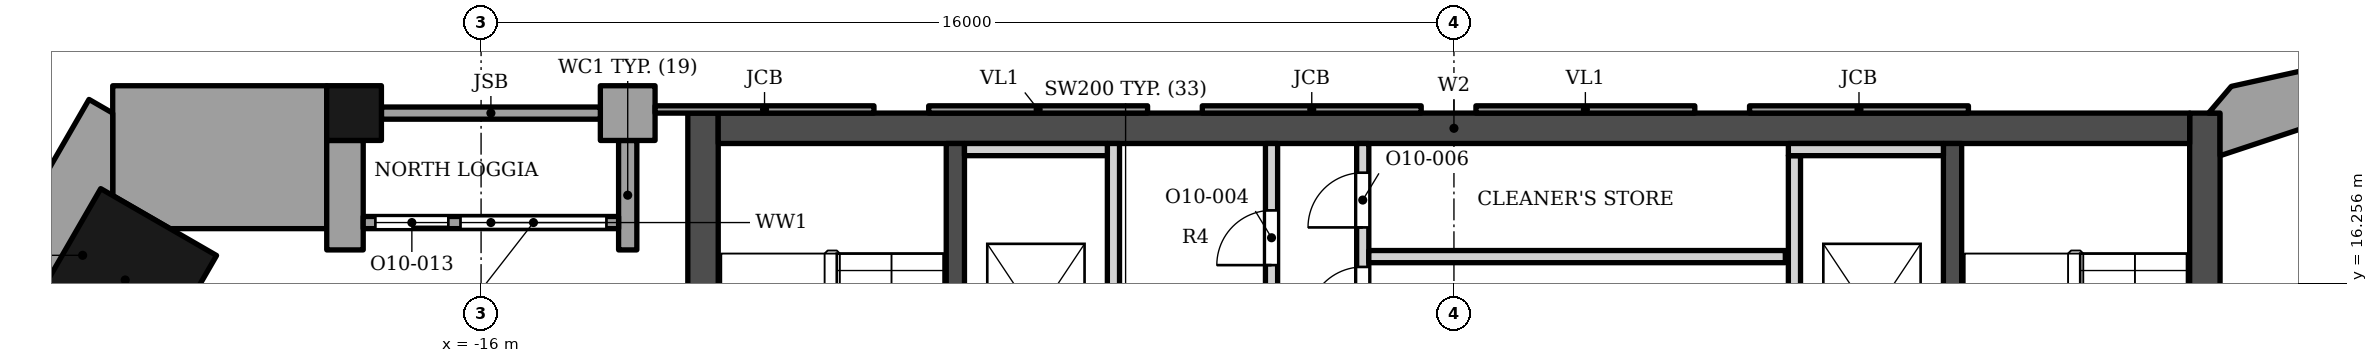
"""IFC4 building model, lengths in metres.
Left out: names, types, materials, properties, quantities, classifications, styles, units other than length and angle.
Written with IfcOpenShell. Run it as: python <this file> out.ifc"""

import sys

from ifc_helpers import new_model, si_unit, direction, frame, frame_2d, origin, origin_2d, place, context, subcontext, project, spatial, polyline, rectangle, outline, extrude, element, fill, save


model = new_model("IFC4")
c1 = context("Model", 3, precision=1e-05, world=origin(), true_north=direction((0.0, 1.0)))
c2 = subcontext(c1, "Body", "Model", "MODEL_VIEW")
j1 = project(units=[si_unit("LENGTHUNIT", "METRE"), si_unit("PLANEANGLEUNIT", "RADIAN")], contexts=[c1])
p1 = place(None, origin())
s1 = spatial("IfcSite", under=j1, at=p1, CompositionType="ELEMENT")
p2 = place(p1, origin())
s2 = spatial("IfcBuilding", under=s1, at=p2, CompositionType="ELEMENT")
p3 = place(p2, frame((0.0, 0.0, 259.9)))
s3 = spatial("IfcBuildingStorey", under=s2, at=p3, CompositionType="ELEMENT", Elevation=259.9)
p4 = place(p3, frame((-12.1, 18.802, 0.0), z_axis=(0.0, 0.0, 1.0), x_axis=(1.0, 0.0, 0.0)))
e1 = element("IfcWall", 1, at=p4, inside=s3, PredefinedType="SHEAR", context=c2, shape_type="SweptSolid", body=[
    extrude(rectangle(XDim=24.2, YDim=0.5, at=frame_2d((12.1, 0.0))), origin(), (0.0, 0.0, 1.0), 3.9),
])
p5 = place(p3, frame((-12.35, 5.253, 0.0), z_axis=(0.0, 0.0, 1.0), x_axis=(0.0, 1.0, 0.0)))
e2 = element("IfcWall", 2, at=p5, inside=s3, PredefinedType="SHEAR", context=c2, shape_type="SweptSolid", body=[
    extrude(rectangle(XDim=13.8, YDim=0.5, at=frame_2d((6.9, 0.0))), origin(), (0.0, 0.0, 1.0), 3.9),
])
p6 = place(p3, frame((-8.2, 5.253, 0.0), z_axis=(0.0, 0.0, 1.0), x_axis=(0.0, 1.0, 0.0)))
e3 = element("IfcWall", 3, at=p6, inside=s3, PredefinedType="SHEAR", context=c2, shape_type="SweptSolid", body=[
    extrude(rectangle(XDim=13.3, YDim=0.3, at=frame_2d((6.65, 0.0))), origin(), (0.0, 0.0, 1.0), 3.9),
])
p7 = place(p6, frame((7.1, 0.0, 0.0)))
e4 = element("IfcOpeningElement", 4, at=p7, cuts=e3, PredefinedType="OPENING", context=c2, shape_type="SweptSolid", body=[
    extrude(rectangle(XDim=1.4, YDim=2.1, at=frame_2d((0.7, 1.05))), frame((0.0, 0.16, 0.0), z_axis=(0.0, -1.0, 0.0), x_axis=(1.0, 0.0, 0.0)), (0.0, 0.0, 1.0), 0.32),
])
p8 = place(p6, frame((5.05, 0.0, 0.0)))
e5 = element("IfcOpeningElement", 5, at=p8, cuts=e3, PredefinedType="OPENING", context=c2, shape_type="SweptSolid", body=[
    extrude(rectangle(XDim=1.4, YDim=2.1, at=frame_2d((0.7, 1.05))), frame((0.0, 0.16, 0.0), z_axis=(0.0, -1.0, 0.0), x_axis=(1.0, 0.0, 0.0)), (0.0, 0.0, 1.0), 0.32),
])
p9 = place(p3, frame((12.35, 5.253, 0.0), z_axis=(0.0, 0.0, 1.0), x_axis=(0.0, 1.0, 0.0)))
e6 = element("IfcWall", 6, at=p9, inside=s3, PredefinedType="SHEAR", context=c2, shape_type="SweptSolid", body=[
    extrude(rectangle(XDim=13.8, YDim=0.5, at=frame_2d((6.9, 0.0))), origin(), (0.0, 0.0, 1.0), 3.9),
])
p10 = place(p3, frame((8.2, 5.253, 0.0), z_axis=(0.0, 0.0, 1.0), x_axis=(0.0, 1.0, 0.0)))
e7 = element("IfcWall", 7, at=p10, inside=s3, PredefinedType="SHEAR", context=c2, shape_type="SweptSolid", body=[
    extrude(rectangle(XDim=13.3, YDim=0.3, at=frame_2d((6.65, 0.0))), origin(), (0.0, 0.0, 1.0), 3.9),
])
p11 = place(p10, frame((7.1, 0.0, 0.0)))
e8 = element("IfcOpeningElement", 8, at=p11, cuts=e7, PredefinedType="OPENING", context=c2, shape_type="SweptSolid", body=[
    extrude(rectangle(XDim=1.4, YDim=2.1, at=frame_2d((0.7, 1.05))), frame((0.0, 0.16, 0.0), z_axis=(0.0, -1.0, 0.0), x_axis=(1.0, 0.0, 0.0)), (0.0, 0.0, 1.0), 0.32),
])
p12 = place(p10, frame((5.05, 0.0, 0.0)))
e9 = element("IfcOpeningElement", 9, at=p12, cuts=e7, PredefinedType="OPENING", context=c2, shape_type="SweptSolid", body=[
    extrude(rectangle(XDim=1.4, YDim=2.1, at=frame_2d((0.7, 1.05))), frame((0.0, 0.16, 0.0), z_axis=(0.0, -1.0, 0.0), x_axis=(1.0, 0.0, 0.0)), (0.0, 0.0, 1.0), 0.32),
])
p13 = place(p3, frame((-21.853, 16.308, 0.0), z_axis=(0.0, 0.0, 1.0), x_axis=(0.866025421238, -0.49999996977, 0.0)))
e10 = element("IfcColumn", 10, at=p13, inside=s3, PredefinedType="COLUMN", context=c2, shape_type="SweptSolid", body=[
    extrude(rectangle(XDim=2.2, YDim=2.2, at=origin_2d()), origin(), (0.0, 0.0, 1.0), 3.9),
])
p14 = place(p3, frame((-18.089, 19.053, 0.0), z_axis=(0.0, 0.0, 1.0), x_axis=(-1.0, 0.0, 0.0)))
e11 = element("IfcColumn", 11, at=p14, inside=s3, PredefinedType="COLUMN", context=c2, shape_type="SweptSolid", body=[
    extrude(rectangle(XDim=0.9, YDim=0.9, at=origin_2d()), origin(), (0.0, 0.0, 1.0), 3.9),
])
p15 = place(p3, origin())
e12 = element("IfcWall", 12, at=p15, inside=s3, PredefinedType="SOLIDWALL", context=c2, shape_type="SweptSolid", body=[
    extrude(outline(polyline([(-13.138, 19.502), (-14.039, 19.502), (-14.039, 18.603), (-13.138, 18.603), (-13.138, 19.502)])), origin(), (0.0, 0.0, 1.0), 3.0),
])
p16 = place(p3, origin())
e13 = element("IfcWall", 13, at=p16, inside=s3, PredefinedType="SOLIDWALL", context=c2, shape_type="SweptSolid", body=[
    extrude(outline(polyline([(-13.438, 16.802), (-13.438, 18.603), (-13.739, 18.603), (-13.739, 16.802), (-13.438, 16.802)])), origin(), (0.0, 0.0, 1.0), 3.0),
])
p17 = place(p3, origin())
e14 = element("IfcWall", 14, at=p17, inside=s3, PredefinedType="SOLIDWALL", context=c2, shape_type="SweptSolid", body=[
    extrude(outline(polyline([(-18.539, 18.603), (-18.539, 16.802), (-17.938, 16.802), (-17.938, 18.603), (-18.539, 18.603)])), origin(), (0.0, 0.0, 1.0), 3.0),
])
p18 = place(p3, origin())
e15 = element("IfcWall", 15, at=p18, inside=s3, PredefinedType="SOLIDWALL", context=c2, shape_type="SweptSolid", body=[
    extrude(outline(polyline([(4.862, 19.173), (4.862, 19.052), (8.461, 19.052), (8.461, 19.173), (4.862, 19.173)])), origin(), (0.0, 0.0, 1.0), 3.0),
])
p19 = place(p3, origin())
e16 = element("IfcWall", 16, at=p19, inside=s3, PredefinedType="ELEMENTEDWALL", context=c2, shape_type="SweptSolid", body=[
    extrude(outline(polyline([(0.362, 19.173), (0.362, 19.052), (3.961, 19.052), (3.961, 19.173), (0.362, 19.173)])), origin(), (0.0, 0.0, 1.0), 3.0),
])
p20 = place(p3, origin())
e17 = element("IfcWall", 17, at=p20, inside=s3, PredefinedType="SOLIDWALL", context=c2, shape_type="SweptSolid", body=[
    extrude(outline(polyline([(-4.138, 19.173), (-4.138, 19.052), (-0.539, 19.052), (-0.539, 19.173), (-4.138, 19.173)])), origin(), (0.0, 0.0, 1.0), 3.0),
])
p21 = place(p3, origin())
e18 = element("IfcWall", 18, at=p21, inside=s3, PredefinedType="ELEMENTEDWALL", context=c2, shape_type="SweptSolid", body=[
    extrude(outline(polyline([(-8.638, 19.173), (-8.638, 19.052), (-5.039, 19.052), (-5.039, 19.173), (-8.638, 19.173)])), origin(), (0.0, 0.0, 1.0), 3.0),
])
p22 = place(p3, origin())
e19 = element("IfcWall", 19, at=p22, inside=s3, PredefinedType="SOLIDWALL", context=c2, shape_type="SweptSolid", body=[
    extrude(outline(polyline([(-13.138, 19.173), (-13.138, 19.052), (-9.539, 19.052), (-9.539, 19.173), (-13.138, 19.173)])), origin(), (0.0, 0.0, 1.0), 3.0),
])
p23 = place(p3, frame((-14.039, 19.052, 0.0), z_axis=(0.0, 0.0, 1.0), x_axis=(-1.0, 0.0, 0.0)))
e20 = element("IfcWall", 20, at=p23, inside=s3, PredefinedType="SOLIDWALL", context=c2, shape_type="SweptSolid", body=[
    extrude(rectangle(XDim=3.6, YDim=0.2, at=frame_2d((1.8, 0.0))), origin(), (0.0, 0.0, 1.0), 3.0),
])
p24 = place(p3, frame((-13.739, 17.252, 0.0), z_axis=(0.0, 0.0, 1.0), x_axis=(-1.0, 0.0, 0.0)))
e21 = element("IfcWall", 21, at=p24, inside=s3, PredefinedType="ELEMENTEDWALL", context=c2, shape_type="SweptSolid", body=[
    extrude(rectangle(XDim=4.2, YDim=0.2, at=frame_2d((2.1, 0.0))), origin(), (0.0, 0.0, 1.0), 3.0),
])
p25 = place(p24, frame((0.2, 0.0, 0.45)))
e22 = element("IfcOpeningElement", 22, at=p25, cuts=e21, PredefinedType="OPENING", context=c2, shape_type="SweptSolid", body=[
    extrude(rectangle(XDim=2.4, YDim=2.25, at=frame_2d((1.2, 1.125))), frame((0.0, 0.11, 0.0), z_axis=(0.0, -1.0, 0.0), x_axis=(1.0, 0.0, 0.0)), (0.0, 0.0, 1.0), 0.22),
])
p26 = place(p24, frame((2.8, 0.0, 0.0)))
e23 = element("IfcOpeningElement", 23, at=p26, cuts=e21, PredefinedType="OPENING", context=c2, shape_type="SweptSolid", body=[
    extrude(rectangle(XDim=1.2, YDim=2.7, at=frame_2d((0.6, 1.35))), frame((0.0, 0.11, 0.0), z_axis=(0.0, -1.0, 0.0), x_axis=(1.0, 0.0, 0.0)), (0.0, 0.0, 1.0), 0.22),
])
p27 = place(p3, origin())
e24 = element("IfcWall", 24, at=p27, inside=s3, PredefinedType="SOLIDWALL", context=c2, shape_type="SweptSolid", body=[
    extrude(outline(polyline([(-21.116, 17.153), (-18.539, 17.153), (-18.539, 18.603), (-18.539, 18.603), (-18.539, 19.502), (-22.058, 19.502), (-22.058, 17.697), (-21.116, 17.153)])), origin(), (0.0, 0.0, 1.0), 3.0),
])
p28 = place(p3, origin())
e25 = element("IfcWall", 25, at=p28, inside=s3, PredefinedType="SOLIDWALL", context=c2, shape_type="SweptSolid", body=[
    extrude(outline(polyline([(-23.356, 15.905), (-22.058, 17.697), (-22.058, 19.052), (-22.448, 19.278), (-24.722, 15.339), (-22.837, 14.25), (-22.1, 15.18), (-23.356, 15.905)])), origin(), (0.0, 0.0, 1.0), 3.0),
])
p29 = place(p3, origin())
e26 = element("IfcWall", 26, at=p29, inside=s3, PredefinedType="SOLIDWALL", context=c2, shape_type="SweptSolid", body=[
    extrude(outline(polyline([(14.201, 18.883), (14.008, 19.762), (12.784, 19.492), (12.41, 19.052), (12.6, 19.052), (12.6, 18.352), (14.201, 18.883)])), origin(), (0.0, 0.0, 1.0), 3.0),
])
p30 = place(p3, frame((-5.6, 14.253, 0.0), z_axis=(0.0, 0.0, 1.0), x_axis=(0.0, 1.0, 0.0)))
e27 = element("IfcWall", 27, at=p30, inside=s3, PredefinedType="SOLIDWALL", context=c2, shape_type="SweptSolid", body=[
    extrude(rectangle(XDim=4.3, YDim=0.2, at=frame_2d((2.15, 0.0))), origin(), (0.0, 0.0, 1.0), 3.73),
])
p31 = place(p3, frame((5.6, 15.453, 0.0), z_axis=(0.0, 0.0, 1.0), x_axis=(0.0, 1.0, 0.0)))
e28 = element("IfcWall", 28, at=p31, inside=s3, PredefinedType="SOLIDWALL", context=c2, shape_type="SweptSolid", body=[
    extrude(rectangle(XDim=2.9, YDim=0.2, at=frame_2d((1.45, 0.0))), origin(), (0.0, 0.0, 1.0), 3.73),
])
p32 = place(p3, frame((-3.0, 15.503, 0.0), z_axis=(0.0, 0.0, 1.0), x_axis=(0.0, 1.0, 0.0)))
e29 = element("IfcWall", 29, at=p32, inside=s3, PredefinedType="SOLIDWALL", context=c2, shape_type="SweptSolid", body=[
    extrude(rectangle(XDim=3.05, YDim=0.2, at=frame_2d((1.525, 0.0))), origin(), (0.0, 0.0, 1.0), 3.73),
])
p33 = place(p32, frame((1.05, 0.0, 0.0)))
e30 = element("IfcOpeningElement", 30, at=p33, cuts=e29, PredefinedType="OPENING", context=c2, shape_type="SweptSolid", body=[
    extrude(rectangle(XDim=0.9, YDim=2.1, at=frame_2d((0.45, 1.05))), frame((0.0, 0.11, 0.0), z_axis=(0.0, -1.0, 0.0), x_axis=(1.0, 0.0, 0.0)), (0.0, 0.0, 1.0), 0.22),
])
p34 = place(p3, frame((-1.5, 15.503, 0.0), z_axis=(0.0, 0.0, 1.0), x_axis=(0.0, 1.0, 0.0)))
e31 = element("IfcWall", 31, at=p34, inside=s3, PredefinedType="SOLIDWALL", context=c2, shape_type="SweptSolid", body=[
    extrude(rectangle(XDim=3.05, YDim=0.2, at=frame_2d((1.525, 0.0))), origin(), (0.0, 0.0, 1.0), 3.73),
])
p35 = place(p34, frame((0.12, 0.0, 0.0)))
e32 = element("IfcOpeningElement", 32, at=p35, cuts=e31, PredefinedType="OPENING", context=c2, shape_type="SweptSolid", body=[
    extrude(rectangle(XDim=0.9, YDim=2.1, at=frame_2d((0.45, 1.05))), frame((0.0, 0.11, 0.0), z_axis=(0.0, -1.0, 0.0), x_axis=(1.0, 0.0, 0.0)), (0.0, 0.0, 1.0), 0.22),
])
p36 = place(p34, frame((1.67, 0.0, 0.0)))
e33 = element("IfcOpeningElement", 33, at=p36, cuts=e31, PredefinedType="OPENING", context=c2, shape_type="SweptSolid", body=[
    extrude(rectangle(XDim=0.9, YDim=2.1, at=frame_2d((0.45, 1.05))), frame((0.0, 0.11, 0.0), z_axis=(0.0, -1.0, 0.0), x_axis=(1.0, 0.0, 0.0)), (0.0, 0.0, 1.0), 0.22),
])
p37 = place(p3, frame((-1.4, 16.693, 0.0), z_axis=(0.0, 0.0, 1.0), x_axis=(1.0, 0.0, 0.0)))
e34 = element("IfcWall", 34, at=p37, inside=s3, PredefinedType="SOLIDWALL", context=c2, shape_type="SweptSolid", body=[
    extrude(rectangle(XDim=6.85, YDim=0.2, at=frame_2d((3.425, 0.0))), origin(), (0.0, 0.0, 1.0), 3.73),
])
p38 = place(p3, frame((-8.05, 18.453, 0.0), z_axis=(0.0, 0.0, 1.0), x_axis=(1.0, 0.0, 0.0)))
e35 = element("IfcWall", 35, at=p38, inside=s3, PredefinedType="SOLIDWALL", context=c2, shape_type="SweptSolid", body=[
    extrude(rectangle(XDim=2.35, YDim=0.2, at=frame_2d((1.175, 0.0))), origin(), (0.0, 0.0, 1.0), 3.73),
])
p39 = place(p3, frame((5.5, 18.453, 0.0), z_axis=(0.0, 0.0, 1.0), x_axis=(1.0, 0.0, 0.0)))
e36 = element("IfcWall", 36, at=p39, inside=s3, PredefinedType="SOLIDWALL", context=c2, shape_type="SweptSolid", body=[
    extrude(rectangle(XDim=2.55, YDim=0.2, at=frame_2d((1.275, 0.0))), origin(), (0.0, 0.0, 1.0), 3.73),
])
p40 = place(p25, origin())
e37 = element("IfcWindow", 37, at=p40, inside=s3, PartitioningType="SINGLE_PANEL", PredefinedType="WINDOW", context=c2, shape_type="SweptSolid", body=[
    extrude(rectangle(XDim=2.4, YDim=2.25, at=frame_2d((1.2, 1.125))), frame((0.0, 0.03, 0.0), z_axis=(0.0, -1.0, 0.0), x_axis=(1.0, 0.0, 0.0)), (0.0, 0.0, 1.0), 0.06),
])
fill(e22, e37)
p41 = place(p26, origin())
e38 = element("IfcDoor", 38, at=p41, inside=s3, OperationType="SINGLE_SWING_LEFT", PredefinedType="DOOR", context=c2, shape_type="SweptSolid", body=[
    extrude(rectangle(XDim=1.2, YDim=2.7, at=frame_2d((0.6, 1.35))), frame((0.0, 0.025, 0.0), z_axis=(0.0, -1.0, 0.0), x_axis=(1.0, 0.0, 0.0)), (0.0, 0.0, 1.0), 0.05),
])
fill(e23, e38)
p42 = place(p33, origin())
e39 = element("IfcDoor", 39, at=p42, inside=s3, OperationType="SINGLE_SWING_LEFT", PredefinedType="DOOR", context=c2, shape_type="SweptSolid", body=[
    extrude(rectangle(XDim=0.9, YDim=2.1, at=frame_2d((0.45, 1.05))), frame((0.0, 0.025, 0.0), z_axis=(0.0, -1.0, 0.0), x_axis=(1.0, 0.0, 0.0)), (0.0, 0.0, 1.0), 0.05),
])
fill(e30, e39)
p43 = place(p35, origin())
e40 = element("IfcDoor", 40, at=p43, inside=s3, OperationType="SINGLE_SWING_LEFT", PredefinedType="DOOR", context=c2, shape_type="SweptSolid", body=[
    extrude(rectangle(XDim=0.9, YDim=2.1, at=frame_2d((0.45, 1.05))), frame((0.0, 0.025, 0.0), z_axis=(0.0, -1.0, 0.0), x_axis=(1.0, 0.0, 0.0)), (0.0, 0.0, 1.0), 0.05),
])
fill(e32, e40)
p44 = place(p36, origin())
e41 = element("IfcDoor", 41, at=p44, inside=s3, OperationType="SINGLE_SWING_LEFT", PredefinedType="DOOR", context=c2, shape_type="SweptSolid", body=[
    extrude(rectangle(XDim=0.9, YDim=2.1, at=frame_2d((0.45, 1.05))), frame((0.0, 0.025, 0.0), z_axis=(0.0, -1.0, 0.0), x_axis=(1.0, 0.0, 0.0)), (0.0, 0.0, 1.0), 0.05),
])
fill(e33, e41)
save(model, sys.argv[1])
